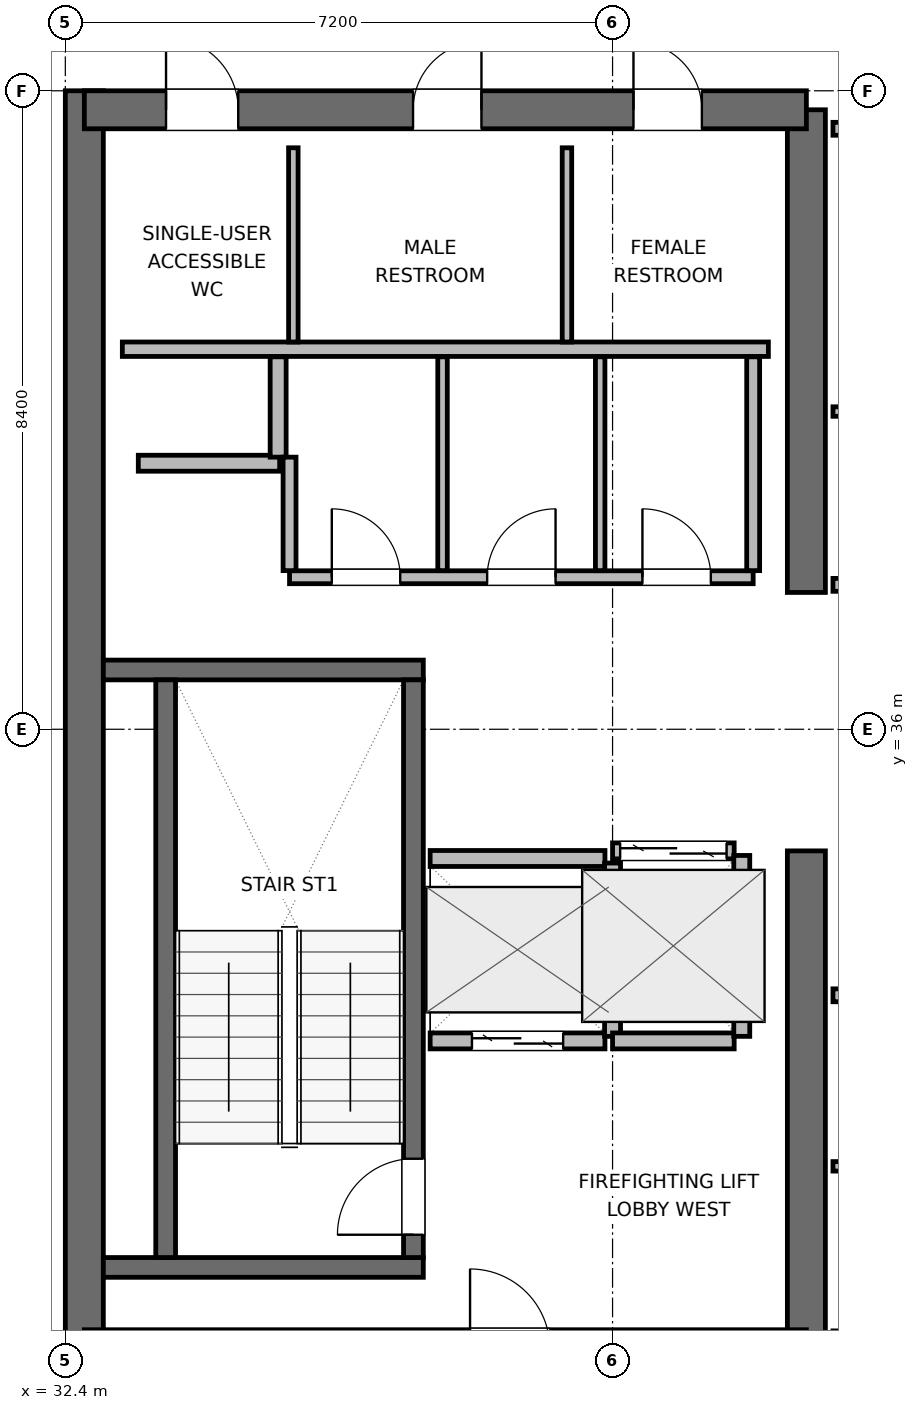
"""IFC4 building model, lengths in metres.
Left out: names, types, materials, properties, quantities, classifications, styles, units other than length and angle.
Written with IfcOpenShell. Run it as: python <this file> out.ifc"""

import sys

from ifc_helpers import new_model, si_unit, direction, frame, frame_2d, origin, place, context, subcontext, project, spatial, rectangle, extrude, element, fill, save


model = new_model("IFC4")
c1 = context("Model", 3, precision=1e-05, world=origin(), true_north=direction((0.0, 1.0)))
c2 = subcontext(c1, "Body", "Model", "MODEL_VIEW")
j1 = project(units=[si_unit("LENGTHUNIT", "METRE"), si_unit("PLANEANGLEUNIT", "RADIAN")], contexts=[c1])
p1 = place(None, origin())
s1 = spatial("IfcSite", under=j1, at=p1, CompositionType="ELEMENT")
p2 = place(p1, origin())
s2 = spatial("IfcBuilding", under=s1, at=p2, CompositionType="ELEMENT")
p3 = place(p2, frame((0.0, 0.0, 302.4)))
s3 = spatial("IfcBuildingStorey", under=s2, at=p3, CompositionType="ELEMENT", Elevation=302.4)
p4 = place(p3, frame((32.65, 27.6, 0.0), z_axis=(0.0, 0.0, 1.0), x_axis=(0.0, 1.0, 0.0)))
e1 = element("IfcWall", 1, at=p4, inside=s3, PredefinedType="SHEAR", context=c2, shape_type="SweptSolid", body=[
    extrude(rectangle(XDim=16.8, YDim=0.5, at=frame_2d((8.4, 0.0))), origin(), (0.0, 0.0, 1.0), 3.9),
])
p5 = place(p3, frame((42.15, 27.85, 0.0), z_axis=(0.0, 0.0, 1.0), x_axis=(0.0, 1.0, 0.0)))
e2 = element("IfcWall", 2, at=p5, inside=s3, PredefinedType="SHEAR", context=c2, shape_type="SweptSolid", body=[
    extrude(rectangle(XDim=6.55, YDim=0.5, at=frame_2d((3.275, 0.0))), origin(), (0.0, 0.0, 1.0), 3.9),
])
p6 = place(p3, frame((42.15, 37.8, 0.0), z_axis=(0.0, 0.0, 1.0), x_axis=(0.0, 1.0, 0.0)))
e3 = element("IfcWall", 3, at=p6, inside=s3, PredefinedType="SHEAR", context=c2, shape_type="SweptSolid", body=[
    extrude(rectangle(XDim=6.35, YDim=0.5, at=frame_2d((3.175, 0.0))), origin(), (0.0, 0.0, 1.0), 3.9),
])
p7 = place(p3, frame((32.65, 27.85, 0.0), z_axis=(0.0, 0.0, 1.0), x_axis=(1.0, 0.0, 0.0)))
e4 = element("IfcWall", 4, at=p7, inside=s3, PredefinedType="SHEAR", context=c2, shape_type="SweptSolid", body=[
    extrude(rectangle(XDim=9.5, YDim=0.5, at=frame_2d((4.75, 0.0))), origin(), (0.0, 0.0, 1.0), 3.9),
])
p8 = place(p7, frame((5.075, 0.0, 0.0)))
e5 = element("IfcOpeningElement", 5, at=p8, cuts=e4, PredefinedType="OPENING", context=c2, shape_type="SweptSolid", body=[
    extrude(rectangle(XDim=1.05, YDim=2.04, at=frame_2d((0.525, 1.02))), frame((0.0, 0.26, 0.0), z_axis=(0.0, -1.0, 0.0), x_axis=(1.0, 0.0, 0.0)), (0.0, 0.0, 1.0), 0.52),
])
p9 = place(p3, frame((32.65, 44.15, 0.0), z_axis=(0.0, 0.0, 1.0), x_axis=(1.0, 0.0, 0.0)))
e6 = element("IfcWall", 6, at=p9, inside=s3, PredefinedType="SHEAR", context=c2, shape_type="SweptSolid", body=[
    extrude(rectangle(XDim=9.5, YDim=0.5, at=frame_2d((4.75, 0.0))), origin(), (0.0, 0.0, 1.0), 3.9),
])
p10 = place(p9, frame((1.075, 0.0, 0.0)))
e7 = element("IfcOpeningElement", 7, at=p10, cuts=e6, PredefinedType="OPENING", context=c2, shape_type="SweptSolid", body=[
    extrude(rectangle(XDim=0.95, YDim=2.04, at=frame_2d((0.475, 1.02))), frame((0.0, 0.26, 0.0), z_axis=(0.0, -1.0, 0.0), x_axis=(1.0, 0.0, 0.0)), (0.0, 0.0, 1.0), 0.52),
])
p11 = place(p9, frame((4.325, 0.0, 0.0)))
e8 = element("IfcOpeningElement", 8, at=p11, cuts=e6, PredefinedType="OPENING", context=c2, shape_type="SweptSolid", body=[
    extrude(rectangle(XDim=0.9, YDim=2.02, at=frame_2d((0.45, 1.01))), frame((0.0, 0.26, 0.0), z_axis=(0.0, -1.0, 0.0), x_axis=(1.0, 0.0, 0.0)), (0.0, 0.0, 1.0), 0.52),
])
p12 = place(p9, frame((7.225, 0.0, 0.0)))
e9 = element("IfcOpeningElement", 9, at=p12, cuts=e6, PredefinedType="OPENING", context=c2, shape_type="SweptSolid", body=[
    extrude(rectangle(XDim=0.9, YDim=2.02, at=frame_2d((0.45, 1.01))), frame((0.0, 0.26, 0.0), z_axis=(0.0, -1.0, 0.0), x_axis=(1.0, 0.0, 0.0)), (0.0, 0.0, 1.0), 0.52),
])
for number, where, z_axis, x_axis in (
    (10, (32.9, 28.92, 0.0), (0.0, 0.0, 1.0), (1.0, 0.0, 0.0)),
    (11, (32.9, 36.78, 0.0), (0.0, 0.0, 1.0), (1.0, 0.0, 0.0)),
):
    element("IfcWall", number, at=place(p3, frame(where, z_axis=z_axis, x_axis=x_axis)), inside=s3, PredefinedType="SHEAR", context=c2, shape_type="SweptSolid", body=[
        extrude(rectangle(XDim=4.21, YDim=0.26, at=frame_2d((2.105, 0.0))), origin(), (0.0, 0.0, 1.0), 3.9),
    ])
p13 = place(p3, frame((33.72, 29.05, 0.0), z_axis=(0.0, 0.0, 1.0), x_axis=(0.0, 1.0, 0.0)))
e12 = element("IfcWall", 12, at=p13, inside=s3, PredefinedType="SHEAR", context=c2, shape_type="SweptSolid", body=[
    extrude(rectangle(XDim=7.6, YDim=0.26, at=frame_2d((3.8, 0.0))), origin(), (0.0, 0.0, 1.0), 3.9),
])
p14 = place(p3, frame((36.98, 29.05, 0.0), z_axis=(0.0, 0.0, 1.0), x_axis=(0.0, 1.0, 0.0)))
e13 = element("IfcWall", 13, at=p14, inside=s3, PredefinedType="SHEAR", context=c2, shape_type="SweptSolid", body=[
    extrude(rectangle(XDim=7.6, YDim=0.26, at=frame_2d((3.8, 0.0))), origin(), (0.0, 0.0, 1.0), 3.9),
])
p15 = place(p14, frame((0.3, 0.0, 0.0)))
e14 = element("IfcOpeningElement", 14, at=p15, cuts=e13, PredefinedType="OPENING", context=c2, shape_type="SweptSolid", body=[
    extrude(rectangle(XDim=1.0, YDim=2.04, at=frame_2d((0.5, 1.02))), frame((0.0, 0.14, 0.0), z_axis=(0.0, -1.0, 0.0), x_axis=(1.0, 0.0, 0.0)), (0.0, 0.0, 1.0), 0.28),
])
p16 = place(p3, frame((33.15, 41.0, 0.0), z_axis=(0.0, 0.0, 1.0), x_axis=(1.0, 0.0, 0.0)))
e15 = element("IfcWall", 15, at=p16, inside=s3, PredefinedType="PLUMBINGWALL", context=c2, shape_type="SweptSolid", body=[
    extrude(rectangle(XDim=8.5, YDim=0.19, at=frame_2d((4.25, 0.0))), origin(), (0.0, 0.0, 1.0), 3.68),
])
for number, where, z_axis, x_axis in (
    (16, (35.4, 41.095, 0.0), (0.0, 0.0, 1.0), (0.0, 1.0, 0.0)),
    (17, (39.0, 41.095, 0.0), (0.0, 0.0, 1.0), (0.0, 1.0, 0.0)),
):
    element("IfcWall", number, at=place(p3, frame(where, z_axis=z_axis, x_axis=x_axis)), inside=s3, PredefinedType="PARTITIONING", context=c2, shape_type="SweptSolid", body=[
        extrude(rectangle(XDim=2.555, YDim=0.125, at=frame_2d((1.277, 0.0))), origin(), (0.0, 0.0, 1.0), 3.68),
    ])
p17 = place(p3, frame((33.36, 39.5, 0.0), z_axis=(0.0, 0.0, 1.0), x_axis=(1.0, 0.0, 0.0)))
e18 = element("IfcWall", 18, at=p17, inside=s3, PredefinedType="PARTITIONING", context=c2, shape_type="SweptSolid", body=[
    extrude(rectangle(XDim=1.86, YDim=0.21, at=frame_2d((0.93, 0.0))), origin(), (0.0, 0.0, 1.0), 3.68),
])
p18 = place(p3, frame((35.2, 39.58, 0.0), z_axis=(0.0, 0.0, 1.0), x_axis=(0.0, 1.0, 0.0)))
e19 = element("IfcWall", 19, at=p18, inside=s3, PredefinedType="PARTITIONING", context=c2, shape_type="SweptSolid", body=[
    extrude(rectangle(XDim=1.32, YDim=0.21, at=frame_2d((0.66, 0.0))), origin(), (0.0, 0.0, 1.0), 3.68),
])
p19 = place(p3, frame((37.2, 31.9, 0.0), z_axis=(0.0, 0.0, 1.0), x_axis=(1.0, 0.0, 0.0)))
e20 = element("IfcWall", 20, at=p19, inside=s3, PredefinedType="PARTITIONING", context=c2, shape_type="SweptSolid", body=[
    extrude(rectangle(XDim=2.3, YDim=0.21, at=frame_2d((1.15, 0.0))), origin(), (0.0, 0.0, 1.0), 3.68),
])
p20 = place(p19, frame((0.55, 0.0, 0.0)))
e21 = element("IfcOpeningElement", 21, at=p20, cuts=e20, PredefinedType="OPENING", context=c2, shape_type="SweptSolid", body=[
    extrude(rectangle(XDim=1.2, YDim=2.04, at=frame_2d((0.6, 1.02))), frame((0.0, 0.115, 0.0), z_axis=(0.0, -1.0, 0.0), x_axis=(1.0, 0.0, 0.0)), (0.0, 0.0, 1.0), 0.23),
])
p21 = place(p3, frame((37.2, 34.3, 0.0), z_axis=(0.0, 0.0, 1.0), x_axis=(1.0, 0.0, 0.0)))
e22 = element("IfcWall", 22, at=p21, inside=s3, PredefinedType="PARTITIONING", context=c2, shape_type="SweptSolid", body=[
    extrude(rectangle(XDim=2.3, YDim=0.21, at=frame_2d((1.15, 0.0))), origin(), (0.0, 0.0, 1.0), 3.68),
])
p22 = place(p3, frame((39.6, 31.96, 0.0), z_axis=(0.0, 0.0, 1.0), x_axis=(0.0, 1.0, 0.0)))
e23 = element("IfcWall", 23, at=p22, inside=s3, PredefinedType="PARTITIONING", context=c2, shape_type="SweptSolid", body=[
    extrude(rectangle(XDim=2.28, YDim=0.21, at=frame_2d((1.14, 0.0))), origin(), (0.0, 0.0, 1.0), 3.68),
])
p23 = place(p3, frame((39.6, 34.4, 0.0), z_axis=(0.0, 0.0, 1.0), x_axis=(1.0, 0.0, 0.0)))
e24 = element("IfcWall", 24, at=p23, inside=s3, PredefinedType="PARTITIONING", context=c2, shape_type="SweptSolid", body=[
    extrude(rectangle(XDim=1.6, YDim=0.21, at=frame_2d((0.8, 0.0))), origin(), (0.0, 0.0, 1.0), 3.68),
])
p24 = place(p23, frame((0.1, 0.0, 0.0)))
e25 = element("IfcOpeningElement", 25, at=p24, cuts=e24, PredefinedType="OPENING", context=c2, shape_type="SweptSolid", body=[
    extrude(rectangle(XDim=1.4, YDim=2.06, at=frame_2d((0.7, 1.03))), frame((0.0, 0.115, 0.0), z_axis=(0.0, -1.0, 0.0), x_axis=(1.0, 0.0, 0.0)), (0.0, 0.0, 1.0), 0.23),
])
p25 = place(p3, frame((39.6, 31.9, 0.0), z_axis=(0.0, 0.0, 1.0), x_axis=(1.0, 0.0, 0.0)))
e26 = element("IfcWall", 26, at=p25, inside=s3, PredefinedType="PARTITIONING", context=c2, shape_type="SweptSolid", body=[
    extrude(rectangle(XDim=1.6, YDim=0.21, at=frame_2d((0.8, 0.0))), origin(), (0.0, 0.0, 1.0), 3.68),
])
p26 = place(p3, frame((41.3, 31.96, 0.0), z_axis=(0.0, 0.0, 1.0), x_axis=(0.0, 1.0, 0.0)))
e27 = element("IfcWall", 27, at=p26, inside=s3, PredefinedType="PARTITIONING", context=c2, shape_type="SweptSolid", body=[
    extrude(rectangle(XDim=2.38, YDim=0.21, at=frame_2d((1.19, 0.0))), origin(), (0.0, 0.0, 1.0), 3.68),
])
p27 = place(p3, frame((35.35, 38.0, 0.0), z_axis=(0.0, 0.0, 1.0), x_axis=(1.0, 0.0, 0.0)))
e28 = element("IfcWall", 28, at=p27, inside=s3, PredefinedType="PARTITIONING", context=c2, shape_type="SweptSolid", body=[
    extrude(rectangle(XDim=6.1, YDim=0.17, at=frame_2d((3.05, 0.0))), origin(), (0.0, 0.0, 1.0), 3.68),
])
p28 = place(p27, frame((0.556, 0.0, 0.0)))
e29 = element("IfcOpeningElement", 29, at=p28, cuts=e28, PredefinedType="OPENING", context=c2, shape_type="SweptSolid", body=[
    extrude(rectangle(XDim=0.9, YDim=2.02, at=frame_2d((0.45, 1.01))), frame((0.0, 0.095, 0.0), z_axis=(0.0, -1.0, 0.0), x_axis=(1.0, 0.0, 0.0)), (0.0, 0.0, 1.0), 0.19),
])
p29 = place(p27, frame((2.6, 0.0, 0.0)))
e30 = element("IfcOpeningElement", 30, at=p29, cuts=e28, PredefinedType="OPENING", context=c2, shape_type="SweptSolid", body=[
    extrude(rectangle(XDim=0.9, YDim=2.02, at=frame_2d((0.45, 1.01))), frame((0.0, 0.095, 0.0), z_axis=(0.0, -1.0, 0.0), x_axis=(1.0, 0.0, 0.0)), (0.0, 0.0, 1.0), 0.19),
])
p30 = place(p27, frame((4.643, 0.0, 0.0)))
e31 = element("IfcOpeningElement", 31, at=p30, cuts=e28, PredefinedType="OPENING", context=c2, shape_type="SweptSolid", body=[
    extrude(rectangle(XDim=0.9, YDim=2.02, at=frame_2d((0.45, 1.01))), frame((0.0, 0.095, 0.0), z_axis=(0.0, -1.0, 0.0), x_axis=(1.0, 0.0, 0.0)), (0.0, 0.0, 1.0), 0.19),
])
p31 = place(p3, frame((35.35, 38.087, 0.0), z_axis=(0.0, 0.0, 1.0), x_axis=(0.0, 1.0, 0.0)))
e32 = element("IfcWall", 32, at=p31, inside=s3, PredefinedType="PARTITIONING", context=c2, shape_type="SweptSolid", body=[
    extrude(rectangle(XDim=1.493, YDim=0.17, at=frame_2d((0.747, 0.0))), origin(), (0.0, 0.0, 1.0), 3.68),
])
p32 = place(p3, frame((41.45, 38.087, 0.0), z_axis=(0.0, 0.0, 1.0), x_axis=(0.0, 1.0, 0.0)))
e33 = element("IfcWall", 33, at=p32, inside=s3, PredefinedType="PARTITIONING", context=c2, shape_type="SweptSolid", body=[
    extrude(rectangle(XDim=2.813, YDim=0.17, at=frame_2d((1.406, 0.0))), origin(), (0.0, 0.0, 1.0), 3.68),
])
for number, where, z_axis, x_axis in (
    (34, (37.363, 38.087, 0.0), (0.0, 0.0, 1.0), (0.0, 1.0, 0.0)),
    (35, (39.437, 38.087, 0.0), (0.0, 0.0, 1.0), (0.0, 1.0, 0.0)),
):
    element("IfcWall", number, at=place(p3, frame(where, z_axis=z_axis, x_axis=x_axis)), inside=s3, PredefinedType="PARTITIONING", context=c2, shape_type="SweptSolid", body=[
        extrude(rectangle(XDim=2.813, YDim=0.125, at=frame_2d((1.406, 0.0))), origin(), (0.0, 0.0, 1.0), 3.68),
    ])
p33 = place(p3, frame((42.5, 32.5, 0.0), z_axis=(0.0, 0.0, 1.0), x_axis=(1.0, 0.0, 0.0)))
e36 = element("IfcWall", 36, at=p33, inside=s3, PredefinedType="PARTITIONING", context=c2, shape_type="SweptSolid", body=[
    extrude(rectangle(XDim=1.3, YDim=0.17, at=frame_2d((0.65, 0.0))), origin(), (0.0, 0.0, 1.0), 3.68),
])
p34 = place(p3, frame((42.5, 30.25, 0.0), z_axis=(0.0, 0.0, 1.0), x_axis=(1.0, 0.0, 0.0)))
e37 = element("IfcWall", 37, at=p34, inside=s3, PredefinedType="PARTITIONING", context=c2, shape_type="SweptSolid", body=[
    extrude(rectangle(XDim=4.213, YDim=0.125, at=frame_2d((2.106, 0.0))), origin(), (0.0, 0.0, 1.0), 3.68),
])
p35 = place(p3, frame((42.5, 37.9, 0.0), z_axis=(0.0, 0.0, 1.0), x_axis=(1.0, 0.0, 0.0)))
e38 = element("IfcWall", 38, at=p35, inside=s3, PredefinedType="PARTITIONING", context=c2, shape_type="SweptSolid", body=[
    extrude(rectangle(XDim=4.213, YDim=0.17, at=frame_2d((2.106, 0.0))), origin(), (0.0, 0.0, 1.0), 3.68),
])
p36 = place(p3, frame((42.5, 43.9, 0.0), z_axis=(0.0, 0.0, 1.0), x_axis=(1.0, 0.0, 0.0)))
e39 = element("IfcWall", 39, at=p36, inside=s3, PredefinedType="PARTITIONING", context=c2, shape_type="SweptSolid", body=[
    extrude(rectangle(XDim=4.213, YDim=0.17, at=frame_2d((2.106, 0.0))), origin(), (0.0, 0.0, 1.0), 2.765),
])
p37 = place(p3, frame((42.5, 40.18, 0.0), z_axis=(0.0, 0.0, 1.0), x_axis=(1.0, 0.0, 0.0)))
e40 = element("IfcWall", 40, at=p37, inside=s3, PredefinedType="PARTITIONING", context=c2, shape_type="SweptSolid", body=[
    extrude(rectangle(XDim=4.213, YDim=0.125, at=frame_2d((2.106, 0.0))), origin(), (0.0, 0.0, 1.0), 3.68),
])
p38 = place(p15, origin())
e41 = element("IfcDoor", 41, at=p38, inside=s3, OperationType="SINGLE_SWING_LEFT", PredefinedType="DOOR", context=c2, shape_type="SweptSolid", body=[
    extrude(rectangle(XDim=1.0, YDim=2.04, at=frame_2d((0.5, 1.02))), frame((0.0, 0.025, 0.0), z_axis=(0.0, -1.0, 0.0), x_axis=(1.0, 0.0, 0.0)), (0.0, 0.0, 1.0), 0.05),
])
fill(e14, e41)
p39 = place(p20, origin())
e42 = element("IfcDoor", 42, at=p39, inside=s3, OperationType="DOUBLE_DOOR_SLIDING", PredefinedType="DOOR", context=c2, shape_type="SweptSolid", body=[
    extrude(rectangle(XDim=1.2, YDim=2.04, at=frame_2d((0.6, 1.02))), frame((0.0, 0.025, 0.0), z_axis=(0.0, -1.0, 0.0), x_axis=(1.0, 0.0, 0.0)), (0.0, 0.0, 1.0), 0.05),
])
fill(e21, e42)
p40 = place(p24, origin())
e43 = element("IfcDoor", 43, at=p40, inside=s3, OperationType="DOUBLE_DOOR_SLIDING", PredefinedType="DOOR", context=c2, shape_type="SweptSolid", body=[
    extrude(rectangle(XDim=1.4, YDim=2.06, at=frame_2d((0.7, 1.03))), frame((0.0, 0.025, 0.0), z_axis=(0.0, -1.0, 0.0), x_axis=(1.0, 0.0, 0.0)), (0.0, 0.0, 1.0), 0.05),
])
fill(e25, e43)
p41 = place(p10, origin())
e44 = element("IfcDoor", 44, at=p41, inside=s3, OperationType="SINGLE_SWING_LEFT", PredefinedType="DOOR", context=c2, shape_type="SweptSolid", body=[
    extrude(rectangle(XDim=0.95, YDim=2.04, at=frame_2d((0.475, 1.02))), frame((0.0, 0.025, 0.0), z_axis=(0.0, -1.0, 0.0), x_axis=(1.0, 0.0, 0.0)), (0.0, 0.0, 1.0), 0.05),
])
fill(e7, e44)
p42 = place(p11, origin())
e45 = element("IfcDoor", 45, at=p42, inside=s3, OperationType="SINGLE_SWING_RIGHT", PredefinedType="DOOR", context=c2, shape_type="SweptSolid", body=[
    extrude(rectangle(XDim=0.9, YDim=2.02, at=frame_2d((0.45, 1.01))), frame((0.0, 0.025, 0.0), z_axis=(0.0, -1.0, 0.0), x_axis=(1.0, 0.0, 0.0)), (0.0, 0.0, 1.0), 0.05),
])
fill(e8, e45)
p43 = place(p12, origin())
e46 = element("IfcDoor", 46, at=p43, inside=s3, OperationType="SINGLE_SWING_LEFT", PredefinedType="DOOR", context=c2, shape_type="SweptSolid", body=[
    extrude(rectangle(XDim=0.9, YDim=2.02, at=frame_2d((0.45, 1.01))), frame((0.0, 0.025, 0.0), z_axis=(0.0, -1.0, 0.0), x_axis=(1.0, 0.0, 0.0)), (0.0, 0.0, 1.0), 0.05),
])
fill(e9, e46)
p44 = place(p28, origin())
e47 = element("IfcDoor", 47, at=p44, inside=s3, OperationType="SINGLE_SWING_LEFT", PredefinedType="DOOR", context=c2, shape_type="SweptSolid", body=[
    extrude(rectangle(XDim=0.9, YDim=2.02, at=frame_2d((0.45, 1.01))), frame((0.0, 0.025, 0.0), z_axis=(0.0, -1.0, 0.0), x_axis=(1.0, 0.0, 0.0)), (0.0, 0.0, 1.0), 0.05),
])
fill(e29, e47)
p45 = place(p29, origin())
e48 = element("IfcDoor", 48, at=p45, inside=s3, OperationType="SINGLE_SWING_RIGHT", PredefinedType="DOOR", context=c2, shape_type="SweptSolid", body=[
    extrude(rectangle(XDim=0.9, YDim=2.02, at=frame_2d((0.45, 1.01))), frame((0.0, 0.025, 0.0), z_axis=(0.0, -1.0, 0.0), x_axis=(1.0, 0.0, 0.0)), (0.0, 0.0, 1.0), 0.05),
])
fill(e30, e48)
p46 = place(p30, origin())
e49 = element("IfcDoor", 49, at=p46, inside=s3, OperationType="SINGLE_SWING_LEFT", PredefinedType="DOOR", context=c2, shape_type="SweptSolid", body=[
    extrude(rectangle(XDim=0.9, YDim=2.02, at=frame_2d((0.45, 1.01))), frame((0.0, 0.025, 0.0), z_axis=(0.0, -1.0, 0.0), x_axis=(1.0, 0.0, 0.0)), (0.0, 0.0, 1.0), 0.05),
])
fill(e31, e49)
save(model, sys.argv[1])
